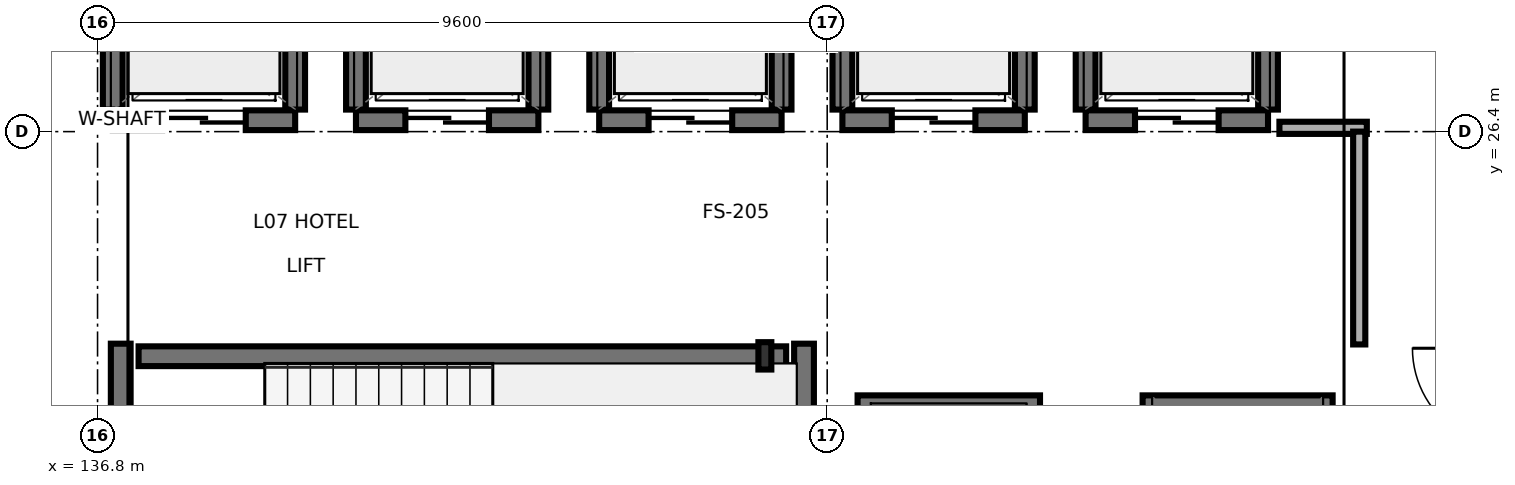
"""IFC4 building model, lengths in metres.
Left out: names, types, materials, properties, quantities, classifications, styles, units other than length and angle.
Written with IfcOpenShell. Run it as: python <this file> out.ifc"""

import sys

from ifc_helpers import new_model, si_unit, direction, frame, frame_2d, origin, origin_2d, place, context, subcontext, project, spatial, rectangle, i_section, extrude, element, fill, save


model = new_model("IFC4")
c1 = context("Model", 3, precision=1e-05, world=origin(), true_north=direction((0.0, 1.0)))
c2 = subcontext(c1, "Body", "Model", "MODEL_VIEW")
j1 = project(units=[si_unit("LENGTHUNIT", "METRE"), si_unit("PLANEANGLEUNIT", "RADIAN")], contexts=[c1])
p1 = place(None, origin())
s1 = spatial("IfcSite", under=j1, at=p1, CompositionType="ELEMENT")
p2 = place(p1, origin())
s2 = spatial("IfcBuilding", under=s1, at=p2, CompositionType="ELEMENT")
p3 = place(p2, frame((0.0, 0.0, 24.9)))
s3 = spatial("IfcBuildingStorey", under=s2, at=p3, CompositionType="ELEMENT", Elevation=24.9)
p4 = place(p3, frame((145.58, 23.45, 0.0), z_axis=(0.0, 0.0, 1.0), x_axis=(1.0, 0.0, 0.0)))
e1 = element("IfcColumn", 1, at=p4, inside=s3, PredefinedType="PILASTER", context=c2, shape_type="SweptSolid", body=[
    extrude(i_section(OverallWidth=0.17, OverallDepth=0.36, WebThickness=0.008, FlangeThickness=0.013, FilletRadius=0.018, at=origin_2d()), origin(), (0.0, 0.0, 1.0), 3.4),
])
p5 = place(p3, frame((137.105, 19.34, 0.0), z_axis=(0.0, 0.0, 1.0), x_axis=(0.0, 1.0, 0.0)))
e2 = element("IfcWall", 2, at=p5, inside=s3, PredefinedType="SHEAR", context=c2, shape_type="SweptSolid", body=[
    extrude(rectangle(XDim=4.27, YDim=0.26, at=frame_2d((2.135, 0.0))), origin(), (0.0, 0.0, 1.0), 3.19),
])
p6 = place(p5, frame((0.61, 0.0, 0.0)))
e3 = element("IfcOpeningElement", 3, at=p6, cuts=e2, PredefinedType="OPENING", context=c2, shape_type="SweptSolid", body=[
    extrude(rectangle(XDim=1.1, YDim=2.2, at=frame_2d((0.55, 1.1))), frame((0.0, 0.14, 0.0), z_axis=(0.0, -1.0, 0.0), x_axis=(1.0, 0.0, 0.0)), (0.0, 0.0, 1.0), 0.28),
])
p7 = place(p3, frame((146.095, 19.34, 0.0), z_axis=(0.0, 0.0, 1.0), x_axis=(0.0, 1.0, 0.0)))
e4 = element("IfcWall", 4, at=p7, inside=s3, PredefinedType="SHEAR", context=c2, shape_type="SweptSolid", body=[
    extrude(rectangle(XDim=4.27, YDim=0.26, at=frame_2d((2.135, 0.0))), origin(), (0.0, 0.0, 1.0), 3.19),
])
p8 = place(p3, frame((137.34, 23.445, 0.0), z_axis=(0.0, 0.0, 1.0), x_axis=(1.0, 0.0, 0.0)))
e5 = element("IfcWall", 5, at=p8, inside=s3, PredefinedType="SHEAR", context=c2, shape_type="SweptSolid", body=[
    extrude(rectangle(XDim=8.52, YDim=0.26, at=frame_2d((4.26, 0.0))), origin(), (0.0, 0.0, 1.0), 3.19),
])
p9 = place(p3, frame((137.0, 26.55, 0.0), z_axis=(0.0, 0.0, 1.0), x_axis=(1.0, 0.0, 0.0)))
e6 = element("IfcWall", 6, at=p9, inside=s3, PredefinedType="SHEAR", context=c2, shape_type="SweptSolid", body=[
    extrude(rectangle(XDim=2.4, YDim=0.26, at=frame_2d((1.2, 0.0))), origin(), (0.0, 0.0, 1.0), 2.725),
])
p10 = place(p9, frame((0.65, 0.0, 0.0)))
e7 = element("IfcOpeningElement", 7, at=p10, cuts=e6, PredefinedType="OPENING", context=c2, shape_type="SweptSolid", body=[
    extrude(rectangle(XDim=1.1, YDim=2.2, at=frame_2d((0.55, 1.1))), frame((0.0, 0.14, 0.0), z_axis=(0.0, -1.0, 0.0), x_axis=(1.0, 0.0, 0.0)), (0.0, 0.0, 1.0), 0.28),
])
for number, where, z_axis, x_axis in (
    (8, (137.0, 26.69, 0.0), (0.0, 0.0, 1.0), (0.0, 1.0, 0.0)),
    (9, (139.4, 26.69, 0.0), (0.0, 0.0, 1.0), (0.0, 1.0, 0.0)),
):
    element("IfcWall", number, at=place(p3, frame(where, z_axis=z_axis, x_axis=x_axis)), inside=s3, PredefinedType="SHEAR", context=c2, shape_type="SweptSolid", body=[
        extrude(rectangle(XDim=1.82, YDim=0.26, at=frame_2d((0.91, 0.0))), origin(), (0.0, 0.0, 1.0), 2.725),
    ])
p11 = place(p3, frame((140.2, 26.55, 0.0), z_axis=(0.0, 0.0, 1.0), x_axis=(1.0, 0.0, 0.0)))
e10 = element("IfcWall", 10, at=p11, inside=s3, PredefinedType="SHEAR", context=c2, shape_type="SweptSolid", body=[
    extrude(rectangle(XDim=2.4, YDim=0.26, at=frame_2d((1.2, 0.0))), origin(), (0.0, 0.0, 1.0), 3.19),
])
p12 = place(p11, frame((0.65, 0.0, 0.0)))
e11 = element("IfcOpeningElement", 11, at=p12, cuts=e10, PredefinedType="OPENING", context=c2, shape_type="SweptSolid", body=[
    extrude(rectangle(XDim=1.1, YDim=2.2, at=frame_2d((0.55, 1.1))), frame((0.0, 0.14, 0.0), z_axis=(0.0, -1.0, 0.0), x_axis=(1.0, 0.0, 0.0)), (0.0, 0.0, 1.0), 0.28),
])
for number, where, z_axis, x_axis in (
    (12, (140.2, 26.69, 0.0), (0.0, 0.0, 1.0), (0.0, 1.0, 0.0)),
    (13, (142.6, 26.69, 0.0), (0.0, 0.0, 1.0), (0.0, 1.0, 0.0)),
):
    element("IfcWall", number, at=place(p3, frame(where, z_axis=z_axis, x_axis=x_axis)), inside=s3, PredefinedType="SHEAR", context=c2, shape_type="SweptSolid", body=[
        extrude(rectangle(XDim=1.82, YDim=0.26, at=frame_2d((0.91, 0.0))), origin(), (0.0, 0.0, 1.0), 3.19),
    ])
p13 = place(p3, frame((143.4, 26.55, 0.0), z_axis=(0.0, 0.0, 1.0), x_axis=(1.0, 0.0, 0.0)))
e14 = element("IfcWall", 14, at=p13, inside=s3, PredefinedType="SHEAR", context=c2, shape_type="SweptSolid", body=[
    extrude(rectangle(XDim=2.4, YDim=0.26, at=frame_2d((1.2, 0.0))), origin(), (0.0, 0.0, 1.0), 3.19),
])
p14 = place(p13, frame((0.65, 0.0, 0.0)))
e15 = element("IfcOpeningElement", 15, at=p14, cuts=e14, PredefinedType="OPENING", context=c2, shape_type="SweptSolid", body=[
    extrude(rectangle(XDim=1.1, YDim=2.2, at=frame_2d((0.55, 1.1))), frame((0.0, 0.14, 0.0), z_axis=(0.0, -1.0, 0.0), x_axis=(1.0, 0.0, 0.0)), (0.0, 0.0, 1.0), 0.28),
])
for number, where, z_axis, x_axis in (
    (16, (143.4, 26.69, 0.0), (0.0, 0.0, 1.0), (0.0, 1.0, 0.0)),
    (17, (145.8, 26.69, 0.0), (0.0, 0.0, 1.0), (0.0, 1.0, 0.0)),
):
    element("IfcWall", number, at=place(p3, frame(where, z_axis=z_axis, x_axis=x_axis)), inside=s3, PredefinedType="SHEAR", context=c2, shape_type="SweptSolid", body=[
        extrude(rectangle(XDim=1.82, YDim=0.26, at=frame_2d((0.91, 0.0))), origin(), (0.0, 0.0, 1.0), 3.19),
    ])
p15 = place(p3, frame((146.6, 26.55, 0.0), z_axis=(0.0, 0.0, 1.0), x_axis=(1.0, 0.0, 0.0)))
e18 = element("IfcWall", 18, at=p15, inside=s3, PredefinedType="SHEAR", context=c2, shape_type="SweptSolid", body=[
    extrude(rectangle(XDim=2.4, YDim=0.26, at=frame_2d((1.2, 0.0))), origin(), (0.0, 0.0, 1.0), 3.19),
])
p16 = place(p15, frame((0.65, 0.0, 0.0)))
e19 = element("IfcOpeningElement", 19, at=p16, cuts=e18, PredefinedType="OPENING", context=c2, shape_type="SweptSolid", body=[
    extrude(rectangle(XDim=1.1, YDim=2.2, at=frame_2d((0.55, 1.1))), frame((0.0, 0.14, 0.0), z_axis=(0.0, -1.0, 0.0), x_axis=(1.0, 0.0, 0.0)), (0.0, 0.0, 1.0), 0.28),
])
for number, where, z_axis, x_axis in (
    (20, (146.6, 26.69, 0.0), (0.0, 0.0, 1.0), (0.0, 1.0, 0.0)),
    (21, (149.0, 26.69, 0.0), (0.0, 0.0, 1.0), (0.0, 1.0, 0.0)),
):
    element("IfcWall", number, at=place(p3, frame(where, z_axis=z_axis, x_axis=x_axis)), inside=s3, PredefinedType="SHEAR", context=c2, shape_type="SweptSolid", body=[
        extrude(rectangle(XDim=1.82, YDim=0.26, at=frame_2d((0.91, 0.0))), origin(), (0.0, 0.0, 1.0), 3.19),
    ])
p17 = place(p3, frame((149.8, 26.55, 0.0), z_axis=(0.0, 0.0, 1.0), x_axis=(1.0, 0.0, 0.0)))
e22 = element("IfcWall", 22, at=p17, inside=s3, PredefinedType="SHEAR", context=c2, shape_type="SweptSolid", body=[
    extrude(rectangle(XDim=2.4, YDim=0.26, at=frame_2d((1.2, 0.0))), origin(), (0.0, 0.0, 1.0), 3.19),
])
p18 = place(p17, frame((0.65, 0.0, 0.0)))
e23 = element("IfcOpeningElement", 23, at=p18, cuts=e22, PredefinedType="OPENING", context=c2, shape_type="SweptSolid", body=[
    extrude(rectangle(XDim=1.1, YDim=2.2, at=frame_2d((0.55, 1.1))), frame((0.0, 0.14, 0.0), z_axis=(0.0, -1.0, 0.0), x_axis=(1.0, 0.0, 0.0)), (0.0, 0.0, 1.0), 0.28),
])
for number, where, z_axis, x_axis in (
    (24, (149.8, 26.69, 0.0), (0.0, 0.0, 1.0), (0.0, 1.0, 0.0)),
    (25, (152.2, 26.69, 0.0), (0.0, 0.0, 1.0), (0.0, 1.0, 0.0)),
):
    element("IfcWall", number, at=place(p3, frame(where, z_axis=z_axis, x_axis=x_axis)), inside=s3, PredefinedType="SHEAR", context=c2, shape_type="SweptSolid", body=[
        extrude(rectangle(XDim=1.82, YDim=0.26, at=frame_2d((0.91, 0.0))), origin(), (0.0, 0.0, 1.0), 3.19),
    ])
p19 = place(p3, frame((146.8, 22.8, 0.0), z_axis=(0.0, 0.0, 1.0), x_axis=(1.0, 0.0, 0.0)))
e26 = element("IfcWall", 26, at=p19, inside=s3, PredefinedType="SHEAR", context=c2, shape_type="SweptSolid", body=[
    extrude(rectangle(XDim=2.4, YDim=0.26, at=frame_2d((1.2, 0.0))), origin(), (0.0, 0.0, 1.0), 3.19),
])
p20 = place(p3, frame((150.55, 22.8, 0.0), z_axis=(0.0, 0.0, 1.0), x_axis=(1.0, 0.0, 0.0)))
e27 = element("IfcWall", 27, at=p20, inside=s3, PredefinedType="SHEAR", context=c2, shape_type="SweptSolid", body=[
    extrude(rectangle(XDim=2.5, YDim=0.26, at=frame_2d((1.25, 0.0))), origin(), (0.0, 0.0, 1.0), 3.19),
])
p21 = place(p3, frame((152.35, 26.45, 0.0), z_axis=(0.0, 0.0, 1.0), x_axis=(1.0, 0.0, 0.0)))
e28 = element("IfcWall", 28, at=p21, inside=s3, PredefinedType="PARTITIONING", context=c2, shape_type="SweptSolid", body=[
    extrude(rectangle(XDim=1.15, YDim=0.16, at=frame_2d((0.575, 0.0))), origin(), (0.0, 0.0, 1.0), 3.19),
])
p22 = place(p3, frame((153.4, 23.6, 0.0), z_axis=(0.0, 0.0, 1.0), x_axis=(0.0, 1.0, 0.0)))
e29 = element("IfcWall", 29, at=p22, inside=s3, PredefinedType="PARTITIONING", context=c2, shape_type="SweptSolid", body=[
    extrude(rectangle(XDim=2.8, YDim=0.16, at=frame_2d((1.4, 0.0))), origin(), (0.0, 0.0, 1.0), 3.19),
])
p23 = place(p10, origin())
e30 = element("IfcDoor", 30, at=p23, inside=s3, OperationType="SLIDING_TO_LEFT", PredefinedType="DOOR", context=c2, shape_type="SweptSolid", body=[
    extrude(rectangle(XDim=1.1, YDim=2.2, at=frame_2d((0.55, 1.1))), frame((0.0, 0.025, 0.0), z_axis=(0.0, -1.0, 0.0), x_axis=(1.0, 0.0, 0.0)), (0.0, 0.0, 1.0), 0.05),
])
fill(e7, e30)
p24 = place(p12, origin())
e31 = element("IfcDoor", 31, at=p24, inside=s3, OperationType="SLIDING_TO_RIGHT", PredefinedType="DOOR", context=c2, shape_type="SweptSolid", body=[
    extrude(rectangle(XDim=1.1, YDim=2.2, at=frame_2d((0.55, 1.1))), frame((0.0, 0.025, 0.0), z_axis=(0.0, -1.0, 0.0), x_axis=(1.0, 0.0, 0.0)), (0.0, 0.0, 1.0), 0.05),
])
fill(e11, e31)
p25 = place(p14, origin())
e32 = element("IfcDoor", 32, at=p25, inside=s3, OperationType="SLIDING_TO_LEFT", PredefinedType="DOOR", context=c2, shape_type="SweptSolid", body=[
    extrude(rectangle(XDim=1.1, YDim=2.2, at=frame_2d((0.55, 1.1))), frame((0.0, 0.025, 0.0), z_axis=(0.0, -1.0, 0.0), x_axis=(1.0, 0.0, 0.0)), (0.0, 0.0, 1.0), 0.05),
])
fill(e15, e32)
p26 = place(p16, origin())
e33 = element("IfcDoor", 33, at=p26, inside=s3, OperationType="SLIDING_TO_RIGHT", PredefinedType="DOOR", context=c2, shape_type="SweptSolid", body=[
    extrude(rectangle(XDim=1.1, YDim=2.2, at=frame_2d((0.55, 1.1))), frame((0.0, 0.025, 0.0), z_axis=(0.0, -1.0, 0.0), x_axis=(1.0, 0.0, 0.0)), (0.0, 0.0, 1.0), 0.05),
])
fill(e19, e33)
p27 = place(p18, origin())
e34 = element("IfcDoor", 34, at=p27, inside=s3, OperationType="SLIDING_TO_LEFT", PredefinedType="DOOR", context=c2, shape_type="SweptSolid", body=[
    extrude(rectangle(XDim=1.1, YDim=2.2, at=frame_2d((0.55, 1.1))), frame((0.0, 0.025, 0.0), z_axis=(0.0, -1.0, 0.0), x_axis=(1.0, 0.0, 0.0)), (0.0, 0.0, 1.0), 0.05),
])
fill(e23, e34)
save(model, sys.argv[1])
